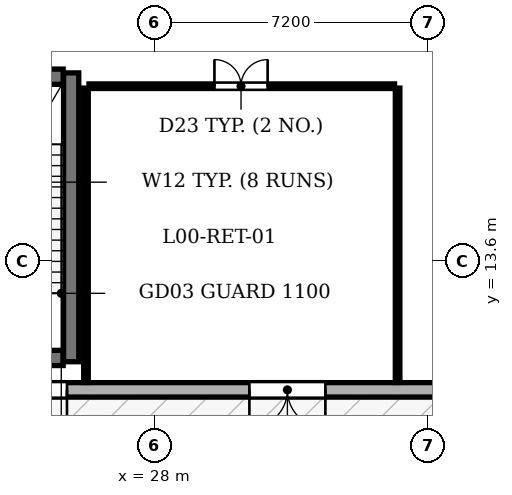
"""IFC4 building model, lengths in metres.
Left out: names, types, materials, properties, quantities, classifications, styles, units other than length and angle.
Written with IfcOpenShell. Run it as: python <this file> out.ifc"""

import sys

from ifc_helpers import new_model, si_unit, direction, frame, frame_2d, origin, place, context, subcontext, project, spatial, rectangle, extrude, element, fill, save


model = new_model("IFC4")
c1 = context("Model", 3, precision=1e-05, world=origin(), true_north=direction((0.0, 1.0)))
c2 = subcontext(c1, "Body", "Model", "MODEL_VIEW")
j1 = project(units=[si_unit("LENGTHUNIT", "METRE"), si_unit("PLANEANGLEUNIT", "RADIAN")], contexts=[c1])
p1 = place(None, origin())
s1 = spatial("IfcSite", under=j1, at=p1, CompositionType="ELEMENT")
p2 = place(p1, origin())
s2 = spatial("IfcBuilding", under=s1, at=p2, CompositionType="ELEMENT")
p3 = place(p2, origin())
s3 = spatial("IfcBuildingStorey", under=s2, at=p3, CompositionType="ELEMENT", Elevation=0.0)
p4 = place(p3, frame((46.3, 10.21, 0.0), z_axis=(0.0, 0.0, 1.0), x_axis=(-1.0, 0.0, 0.0)))
e1 = element("IfcWall", 1, at=p4, inside=s3, PredefinedType="STANDARD", context=c2, shape_type="SweptSolid", body=[
    extrude(rectangle(XDim=34.1, YDim=0.38, at=frame_2d((17.05, 0.0))), origin(), (0.0, 0.0, 1.0), 3.135),
])
p5 = place(p4, frame((13.8, 0.0, 0.0)))
e2 = element("IfcOpeningElement", 2, at=p5, cuts=e1, PredefinedType="OPENING", context=c2, shape_type="SweptSolid", body=[
    extrude(rectangle(XDim=2.0, YDim=2.3, at=frame_2d((1.0, 1.15))), frame((0.0, 0.2, 0.0), z_axis=(0.0, -1.0, 0.0), x_axis=(1.0, 0.0, 0.0)), (0.0, 0.0, 1.0), 0.4),
])
p6 = place(p4, frame((20.6, 0.0, 0.0)))
e3 = element("IfcOpeningElement", 3, at=p6, cuts=e1, PredefinedType="OPENING", context=c2, shape_type="SweptSolid", body=[
    extrude(rectangle(XDim=1.8, YDim=2.3, at=frame_2d((0.9, 1.15))), frame((0.0, 0.2, 0.0), z_axis=(0.0, -1.0, 0.0), x_axis=(1.0, 0.0, 0.0)), (0.0, 0.0, 1.0), 0.4),
])
p7 = place(p4, frame((22.8, 0.0, 0.0)))
e4 = element("IfcOpeningElement", 4, at=p7, cuts=e1, PredefinedType="OPENING", context=c2, shape_type="SweptSolid", body=[
    extrude(rectangle(XDim=2.0, YDim=2.3, at=frame_2d((1.0, 1.15))), frame((0.0, 0.2, 0.0), z_axis=(0.0, -1.0, 0.0), x_axis=(1.0, 0.0, 0.0)), (0.0, 0.0, 1.0), 0.4),
])
p8 = place(p4, frame((28.8, 0.0, 0.0)))
e5 = element("IfcOpeningElement", 5, at=p8, cuts=e1, PredefinedType="OPENING", context=c2, shape_type="SweptSolid", body=[
    extrude(rectangle(XDim=2.0, YDim=2.3, at=frame_2d((1.0, 1.15))), frame((0.0, 0.2, 0.0), z_axis=(0.0, -1.0, 0.0), x_axis=(1.0, 0.0, 0.0)), (0.0, 0.0, 1.0), 0.4),
])
p9 = place(p3, frame((25.81, 10.95, 0.0), z_axis=(0.0, 0.0, 1.0), x_axis=(0.0, 1.0, 0.0)))
e6 = element("IfcWall", 6, at=p9, inside=s3, PredefinedType="SHEAR", context=c2, shape_type="SweptSolid", body=[
    extrude(rectangle(XDim=7.6, YDim=0.4, at=frame_2d((3.8, 0.0))), origin(), (0.0, 0.0, 1.0), 4.95),
])
for number, where, z_axis, x_axis in (
    (7, (22.4, 11.05, 0.0), (0.0, 0.0, 1.0), (1.0, 0.0, 0.0)),
    (8, (22.4, 18.45, 0.0), (0.0, 0.0, 1.0), (1.0, 0.0, 0.0)),
):
    element("IfcWall", number, at=place(p3, frame(where, z_axis=z_axis, x_axis=x_axis)), inside=s3, PredefinedType="SHEAR", context=c2, shape_type="SweptSolid", body=[
        extrude(rectangle(XDim=3.2, YDim=0.4, at=frame_2d((1.6, 0.0))), origin(), (0.0, 0.0, 1.0), 4.95),
    ])
p10 = place(p3, frame((26.2, 10.405, 0.0), z_axis=(0.0, 0.0, 1.0), x_axis=(0.0, 1.0, 0.0)))
e9 = element("IfcWall", 9, at=p10, inside=s3, PredefinedType="PARTITIONING", context=c2, shape_type="SweptSolid", body=[
    extrude(rectangle(XDim=7.745, YDim=0.12, at=frame_2d((3.873, 0.0))), origin(), (0.0, 0.0, 1.0), 4.385),
])
p11 = place(p3, frame((34.4, 10.405, 0.0), z_axis=(0.0, 0.0, 1.0), x_axis=(0.0, 1.0, 0.0)))
e10 = element("IfcWall", 10, at=p11, inside=s3, PredefinedType="PARTITIONING", context=c2, shape_type="SweptSolid", body=[
    extrude(rectangle(XDim=7.745, YDim=0.12, at=frame_2d((3.873, 0.0))), origin(), (0.0, 0.0, 1.0), 4.95),
])
p12 = place(p3, frame((26.28, 18.2, 0.0), z_axis=(0.0, 0.0, 1.0), x_axis=(1.0, 0.0, 0.0)))
e11 = element("IfcWall", 11, at=p12, inside=s3, PredefinedType="PARTITIONING", context=c2, shape_type="SweptSolid", body=[
    extrude(rectangle(XDim=8.04, YDim=0.12, at=frame_2d((4.02, 0.0))), origin(), (0.0, 0.0, 1.0), 4.95),
])
p13 = place(p12, frame((3.3, 0.0, 0.0)))
e12 = element("IfcOpeningElement", 12, at=p13, cuts=e11, PredefinedType="OPENING", context=c2, shape_type="SweptSolid", body=[
    extrude(rectangle(XDim=1.4, YDim=2.15, at=frame_2d((0.7, 1.075))), frame((0.0, 0.07, 0.0), z_axis=(0.0, -1.0, 0.0), x_axis=(1.0, 0.0, 0.0)), (0.0, 0.0, 1.0), 0.14),
])
p14 = place(p5, origin())
e13 = element("IfcDoor", 13, at=p14, inside=s3, OperationType="DOUBLE_DOOR_SINGLE_SWING", PredefinedType="DOOR", context=c2, shape_type="SweptSolid", body=[
    extrude(rectangle(XDim=2.0, YDim=2.3, at=frame_2d((1.0, 1.15))), frame((0.0, 0.025, 0.0), z_axis=(0.0, -1.0, 0.0), x_axis=(1.0, 0.0, 0.0)), (0.0, 0.0, 1.0), 0.05),
])
fill(e2, e13)
p15 = place(p6, origin())
e14 = element("IfcDoor", 14, at=p15, inside=s3, OperationType="DOUBLE_DOOR_SINGLE_SWING", PredefinedType="DOOR", context=c2, shape_type="SweptSolid", body=[
    extrude(rectangle(XDim=1.8, YDim=2.3, at=frame_2d((0.9, 1.15))), frame((0.0, 0.025, 0.0), z_axis=(0.0, -1.0, 0.0), x_axis=(1.0, 0.0, 0.0)), (0.0, 0.0, 1.0), 0.05),
])
fill(e3, e14)
p16 = place(p13, origin())
e15 = element("IfcDoor", 15, at=p16, inside=s3, OperationType="DOUBLE_DOOR_SINGLE_SWING", PredefinedType="DOOR", context=c2, shape_type="SweptSolid", body=[
    extrude(rectangle(XDim=1.4, YDim=2.15, at=frame_2d((0.7, 1.075))), frame((0.0, 0.025, 0.0), z_axis=(0.0, -1.0, 0.0), x_axis=(1.0, 0.0, 0.0)), (0.0, 0.0, 1.0), 0.05),
])
fill(e12, e15)
save(model, sys.argv[1])
